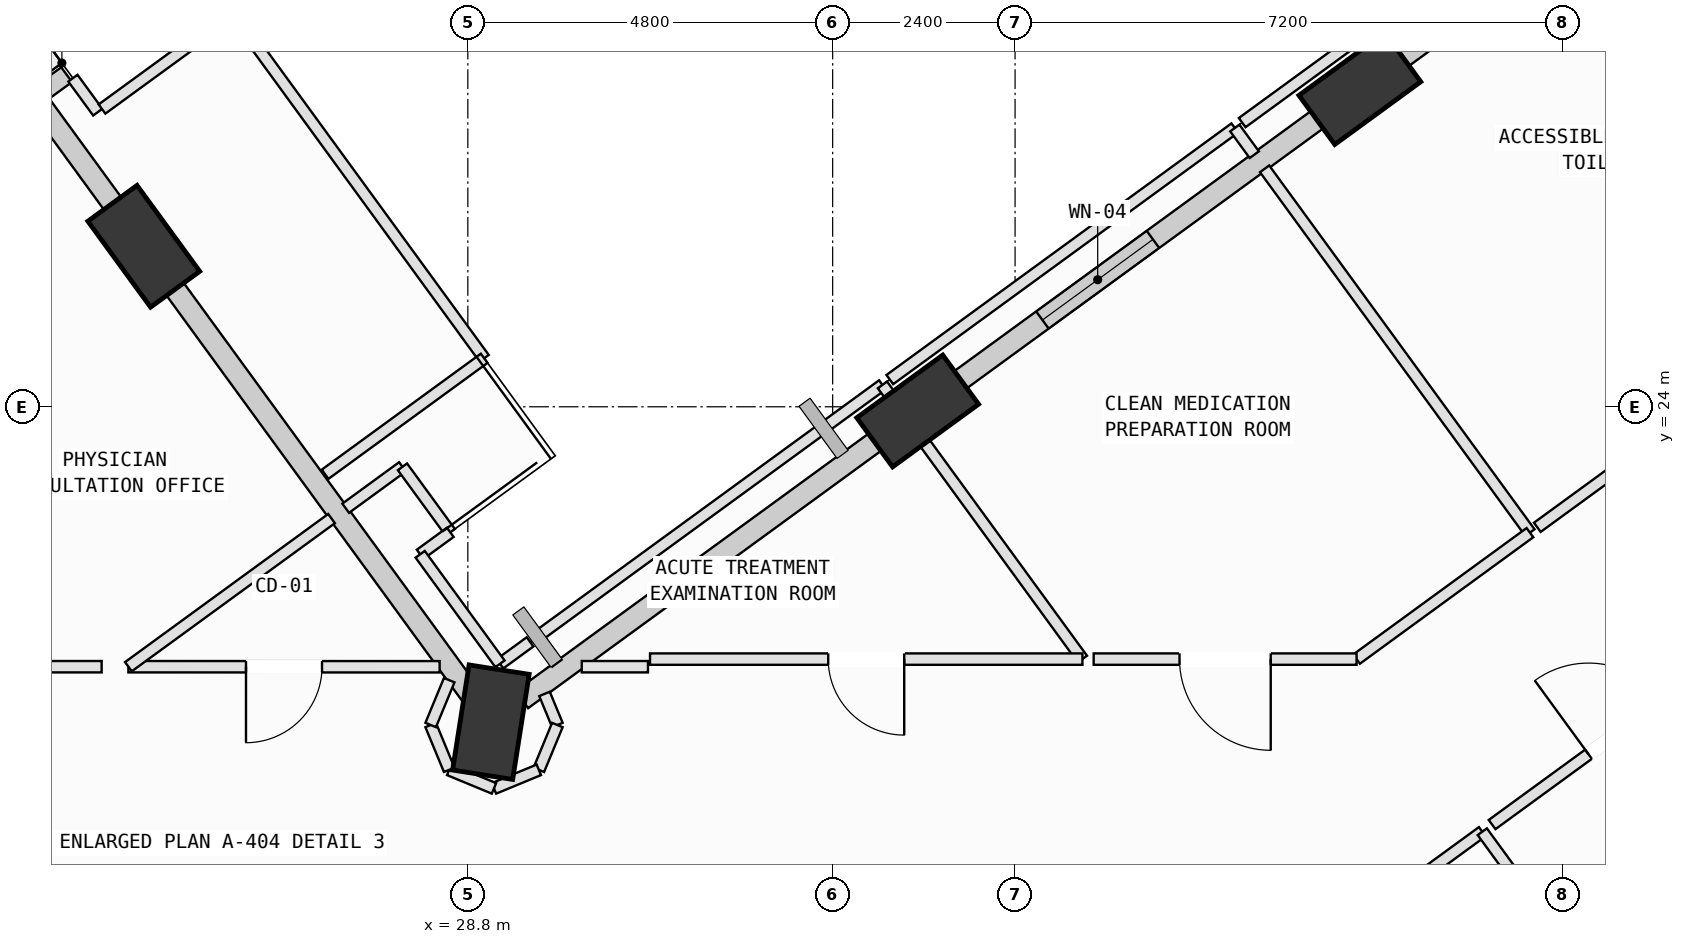
"""IFC4 building model, lengths in metres.
Left out: names, types, materials, properties, quantities, classifications, styles, units other than length and angle.
Written with IfcOpenShell. Run it as: python <this file> out.ifc"""

import sys

from ifc_helpers import new_model, si_unit, direction, frame, frame_2d, origin, origin_2d, place, context, subcontext, project, spatial, rectangle, extrude, element, fill, save


model = new_model("IFC4")
c1 = context("Model", 3, precision=1e-05, world=origin(), true_north=direction((0.0, 1.0)))
c2 = subcontext(c1, "Body", "Model", "MODEL_VIEW")
j1 = project(units=[si_unit("LENGTHUNIT", "METRE"), si_unit("PLANEANGLEUNIT", "RADIAN")], contexts=[c1])
p1 = place(None, origin())
s1 = spatial("IfcSite", under=j1, at=p1, CompositionType="ELEMENT")
p2 = place(p1, origin())
s2 = spatial("IfcBuilding", under=s1, at=p2, CompositionType="ELEMENT")
p3 = place(p2, frame((0.0, 0.0, 177.8)))
s3 = spatial("IfcBuildingStorey", under=s2, at=p3, CompositionType="ELEMENT", Elevation=177.8)
p4 = place(p3, frame((40.536, 28.187, 0.002), z_axis=(-0.014288016572, 0.028576033144, 0.999489501152), x_axis=(-0.459326015506, -0.888068274517, 0.018824220468)))
e1 = element("IfcColumn", 1, at=p4, inside=s3, PredefinedType="COLUMN", context=c2, shape_type="SweptSolid", body=[
    extrude(rectangle(XDim=1.4, YDim=0.8, at=origin_2d()), origin(), (0.0, 0.0, 1.0), 3.998),
])
p5 = place(p3, frame((34.719, 23.945, 0.002), z_axis=(0.003543221591, 0.004703932113, 0.999982659151), x_axis=(-0.999873545111, 0.015519473566, 0.003469831154)))
e2 = element("IfcColumn", 2, at=p5, inside=s3, PredefinedType="COLUMN", context=c2, shape_type="SweptSolid", body=[
    extrude(rectangle(XDim=1.4, YDim=0.8, at=origin_2d()), origin(), (0.0, 0.0, 1.0), 3.996),
])
p6 = place(p3, frame((29.103, 19.85, 0.002), z_axis=(0.020701917139, -0.018442415858, 0.999615580073), x_axis=(-0.634495197242, 0.772441293225, 0.027391480385)))
e3 = element("IfcColumn", 3, at=p6, inside=s3, PredefinedType="COLUMN", context=c2, shape_type="SweptSolid", body=[
    extrude(rectangle(XDim=1.4, YDim=0.8, at=origin_2d()), origin(), (0.0, 0.0, 1.0), 3.998),
])
p7 = place(p3, frame((24.537, 26.112, 0.002), z_axis=(-0.005127954064, -0.037604996467, 0.999279524622), x_axis=(-0.474702077533, 0.879612161779, 0.030665655638)))
e4 = element("IfcColumn", 4, at=p7, inside=s3, PredefinedType="COLUMN", context=c2, shape_type="SweptSolid", body=[
    extrude(rectangle(XDim=1.4, YDim=0.8, at=origin_2d()), origin(), (0.0, 0.0, 1.0), 3.999),
])
p8 = place(p3, frame((21.501, 26.897, 0.0), z_axis=(0.0, 0.0, 1.0), x_axis=(0.808013341442, 0.589164187686, 0.0)))
e5 = element("IfcWall", 5, at=p8, inside=s3, PredefinedType="SOLIDWALL", context=c2, shape_type="SweptSolid", body=[
    extrude(rectangle(XDim=2.5, YDim=0.24, at=frame_2d((1.25, 0.0))), origin(), (0.0, 0.0, 1.0), 3.265),
])
p9 = place(p3, frame((40.942, 28.483, 0.0), z_axis=(0.0, 0.0, 1.0), x_axis=(0.807987697301, 0.589199355915, 0.0)))
e6 = element("IfcWall", 6, at=p9, inside=s3, PredefinedType="SOLIDWALL", context=c2, shape_type="SweptSolid", body=[
    extrude(rectangle(XDim=6.227, YDim=0.28, at=frame_2d((3.113, 0.0))), origin(), (0.0, 0.0, 1.0), 3.065),
])
p10 = place(p9, frame((0.996, 0.0, 0.75)))
e7 = element("IfcOpeningElement", 7, at=p10, cuts=e6, PredefinedType="OPENING", context=c2, shape_type="SweptSolid", body=[
    extrude(rectangle(XDim=1.4, YDim=1.85, at=frame_2d((0.7, 0.925))), frame((0.0, 0.15, 0.0), z_axis=(0.0, -1.0, 0.0), x_axis=(1.0, 0.0, 0.0)), (0.0, 0.0, 1.0), 0.3),
])
p11 = place(p3, frame((35.129, 24.244, 0.0), z_axis=(0.0, 0.0, 1.0), x_axis=(0.808002852065, 0.589178573147, 0.0)))
e8 = element("IfcWall", 8, at=p11, inside=s3, PredefinedType="SOLIDWALL", context=c2, shape_type="SweptSolid", body=[
    extrude(rectangle(XDim=6.211, YDim=0.28, at=frame_2d((3.105, 0.0))), origin(), (0.0, 0.0, 1.0), 3.265),
])
p12 = place(p11, frame((1.524, 0.0, 0.75)))
e9 = element("IfcOpeningElement", 9, at=p12, cuts=e8, PredefinedType="OPENING", context=c2, shape_type="SweptSolid", body=[
    extrude(rectangle(XDim=1.8, YDim=2.05, at=frame_2d((0.9, 1.025))), frame((0.0, 0.15, 0.0), z_axis=(0.0, -1.0, 0.0), x_axis=(1.0, 0.0, 0.0)), (0.0, 0.0, 1.0), 0.3),
])
p13 = place(p3, frame((29.511, 20.147, 0.0), z_axis=(0.0, 0.0, 1.0), x_axis=(0.807984372864, 0.589203914793, 0.0)))
e10 = element("IfcWall", 10, at=p13, inside=s3, PredefinedType="SOLIDWALL", context=c2, shape_type="SweptSolid", body=[
    extrude(rectangle(XDim=5.96, YDim=0.28, at=frame_2d((2.98, 0.0))), origin(), (0.0, 0.0, 1.0), 3.265),
])
p14 = place(p3, frame((28.843, 20.207, 0.0), z_axis=(0.0, 0.0, 1.0), x_axis=(-0.589197701426, 0.807988903782, 0.0)))
e11 = element("IfcWall", 11, at=p14, inside=s3, PredefinedType="SOLIDWALL", context=c2, shape_type="SweptSolid", body=[
    extrude(rectangle(XDim=6.76, YDim=0.28, at=frame_2d((3.38, 0.0))), origin(), (0.0, 0.0, 1.0), 3.265),
])
p15 = place(p3, frame((24.278, 26.466, 0.0), z_axis=(0.0, 0.0, 1.0), x_axis=(-0.589146798516, 0.808026020496, 0.0)))
e12 = element("IfcWall", 12, at=p15, inside=s3, PredefinedType="SOLIDWALL", context=c2, shape_type="SweptSolid", body=[
    extrude(rectangle(XDim=1.964, YDim=0.28, at=frame_2d((0.982, 0.0))), origin(), (0.0, 0.0, 1.0), 3.245),
])
p16 = place(p3, frame((38.64, 15.851, 0.0), z_axis=(0.0, 0.0, 1.0), x_axis=(0.807940029347, 0.589264718933, 0.0)))
e13 = element("IfcWall", 13, at=p16, inside=s3, PredefinedType="PARTITIONING", context=c2, shape_type="SweptSolid", body=[
    extrude(rectangle(XDim=4.341, YDim=0.15, at=frame_2d((2.17, 0.0))), origin(), (0.0, 0.0, 1.0), 3.78),
])
p17 = place(p16, frame((1.57, 0.0, 0.0)))
e14 = element("IfcOpeningElement", 14, at=p17, cuts=e13, PredefinedType="OPENING", context=c2, shape_type="SweptSolid", body=[
    extrude(rectangle(XDim=1.2, YDim=2.15, at=frame_2d((0.6, 1.075))), frame((0.0, 0.085, 0.0), z_axis=(0.0, -1.0, 0.0), x_axis=(1.0, 0.0, 0.0)), (0.0, 0.0, 1.0), 0.17),
])
p18 = place(p3, frame((42.147, 18.409, 0.0), z_axis=(0.0, 0.0, 1.0), x_axis=(0.589164923699, -0.808012804776, 0.0)))
e15 = element("IfcWall", 15, at=p18, inside=s3, PredefinedType="PARTITIONING", context=c2, shape_type="SweptSolid", body=[
    extrude(rectangle(XDim=11.936, YDim=0.15, at=frame_2d((5.968, 0.0))), origin(), (0.0, 0.0, 1.0), 3.78),
])
p19 = place(p3, frame((42.276, 18.503, 0.0), z_axis=(0.0, 0.0, 1.0), x_axis=(0.808020361036, 0.589154560494, 0.0)))
e16 = element("IfcWall", 16, at=p19, inside=s3, PredefinedType="PARTITIONING", context=c2, shape_type="SweptSolid", body=[
    extrude(rectangle(XDim=4.34, YDim=0.15, at=frame_2d((2.17, 0.0))), origin(), (0.0, 0.0, 1.0), 3.78),
])
p20 = place(p19, frame((1.57, 0.0, 0.0)))
e17 = element("IfcOpeningElement", 17, at=p20, cuts=e16, PredefinedType="OPENING", context=c2, shape_type="SweptSolid", body=[
    extrude(rectangle(XDim=1.2, YDim=2.15, at=frame_2d((0.6, 1.075))), frame((0.0, 0.085, 0.0), z_axis=(0.0, -1.0, 0.0), x_axis=(1.0, 0.0, 0.0)), (0.0, 0.0, 1.0), 0.17),
])
p21 = place(p3, frame((29.223, 20.618, 0.0), z_axis=(0.0, 0.0, 1.0), x_axis=(0.807701219135, 0.589592011995, 0.0)))
e18 = element("IfcWall", 18, at=p21, inside=s3, PredefinedType="PARTITIONING", context=c2, shape_type="SweptSolid", body=[
    extrude(rectangle(XDim=0.49, YDim=0.15, at=frame_2d((0.245, 0.0))), origin(), (0.0, 0.0, 1.0), 3.78),
])
p22 = place(p3, frame((29.809, 20.222, 0.0), z_axis=(0.0, 0.0, 1.0), x_axis=(0.381831882466, -0.92423179643, 0.0)))
e19 = element("IfcWall", 19, at=p22, inside=s3, PredefinedType="PARTITIONING", context=c2, shape_type="SweptSolid", body=[
    extrude(rectangle(XDim=0.442, YDim=0.15, at=frame_2d((0.221, 0.0))), origin(), (0.0, 0.0, 1.0), 3.78),
])
p23 = place(p3, frame((29.978, 19.813, 0.0), z_axis=(0.0, 0.0, 1.0), x_axis=(-0.382306769343, -0.924035461503, 0.0)))
e20 = element("IfcWall", 20, at=p23, inside=s3, PredefinedType="PARTITIONING", context=c2, shape_type="SweptSolid", body=[
    extrude(rectangle(XDim=0.639, YDim=0.15, at=frame_2d((0.319, 0.0))), origin(), (0.0, 0.0, 1.0), 3.78),
])
p24 = place(p3, frame((29.734, 19.223, 0.0), z_axis=(0.0, 0.0, 1.0), x_axis=(-0.924114659462, -0.382115291723, 0.0)))
e21 = element("IfcWall", 21, at=p24, inside=s3, PredefinedType="PARTITIONING", context=c2, shape_type="SweptSolid", body=[
    extrude(rectangle(XDim=0.638, YDim=0.15, at=frame_2d((0.319, 0.0))), origin(), (0.0, 0.0, 1.0), 3.415),
])
p25 = place(p3, frame((29.144, 18.979, 0.0), z_axis=(0.0, 0.0, 1.0), x_axis=(-0.923946844683, 0.382520885967, 0.0)))
e22 = element("IfcWall", 22, at=p25, inside=s3, PredefinedType="PARTITIONING", context=c2, shape_type="SweptSolid", body=[
    extrude(rectangle(XDim=0.638, YDim=0.15, at=frame_2d((0.319, 0.0))), origin(), (0.0, 0.0, 1.0), 3.78),
])
for number, where, z_axis, x_axis in (
    (23, (28.555, 19.223, 0.0), (0.0, 0.0, 1.0), (-0.382, 0.924, 0.0)),
    (24, (28.311, 19.813, 0.0), (0.0, 0.0, 1.0), (0.382, 0.924, 0.0)),
):
    element("IfcWall", number, at=place(p3, frame(where, z_axis=z_axis, x_axis=x_axis)), inside=s3, PredefinedType="PARTITIONING", context=c2, shape_type="SweptSolid", body=[
        extrude(rectangle(XDim=0.638, YDim=0.15, at=frame_2d((0.319, 0.0))), origin(), (0.0, 0.0, 1.0), 3.78),
    ])
p26 = place(p3, frame((28.429, 20.579, 0.0), z_axis=(0.0, 0.0, 1.0), x_axis=(-0.999999971564, 0.0002384785, 0.0)))
e25 = element("IfcWall", 25, at=p26, inside=s3, PredefinedType="PARTITIONING", context=c2, shape_type="SweptSolid", body=[
    extrude(rectangle(XDim=4.095, YDim=0.15, at=frame_2d((2.047, 0.0))), origin(), (0.0, 0.0, 1.0), 3.78),
])
p27 = place(p26, frame((1.548, 0.0, 0.0)))
e26 = element("IfcOpeningElement", 26, at=p27, cuts=e25, PredefinedType="OPENING", context=c2, shape_type="SweptSolid", body=[
    extrude(rectangle(XDim=1.0, YDim=2.12, at=frame_2d((0.5, 1.06))), frame((0.0, 0.085, 0.0), z_axis=(0.0, -1.0, 0.0), x_axis=(1.0, 0.0, 0.0)), (0.0, 0.0, 1.0), 0.17),
])
p28 = place(p3, frame((24.334, 20.58, 0.0), z_axis=(0.0, 0.0, 1.0), x_axis=(0.808030219446, 0.589141039532, 0.0)))
e27 = element("IfcWall", 27, at=p28, inside=s3, PredefinedType="PARTITIONING", context=c2, shape_type="SweptSolid", body=[
    extrude(rectangle(XDim=3.308, YDim=0.15, at=frame_2d((1.654, 0.0))), origin(), (0.0, 0.0, 1.0), 3.78),
])
p29 = place(p3, frame((27.193, 22.665, 0.0), z_axis=(0.0, 0.0, 1.0), x_axis=(0.807821533762, 0.589427153761, 0.0)))
e28 = element("IfcWall", 28, at=p29, inside=s3, PredefinedType="PARTITIONING", context=c2, shape_type="SweptSolid", body=[
    extrude(rectangle(XDim=0.925, YDim=0.15, at=frame_2d((0.462, 0.0))), origin(), (0.0, 0.0, 1.0), 3.78),
])
p30 = place(p3, frame((27.94, 23.21, 0.0), z_axis=(0.0, 0.0, 1.0), x_axis=(0.589517481751, -0.807755618185, 0.0)))
e29 = element("IfcWall", 29, at=p30, inside=s3, PredefinedType="PARTITIONING", context=c2, shape_type="SweptSolid", body=[
    extrude(rectangle(XDim=1.067, YDim=0.15, at=frame_2d((0.534, 0.0))), origin(), (0.0, 0.0, 1.0), 3.78),
])
p31 = place(p3, frame((28.569, 22.348, 0.0), z_axis=(0.0, 0.0, 1.0), x_axis=(-0.807938361971, -0.589267005063, 0.0)))
e30 = element("IfcWall", 30, at=p31, inside=s3, PredefinedType="PARTITIONING", context=c2, shape_type="SweptSolid", body=[
    extrude(rectangle(XDim=0.49, YDim=0.15, at=frame_2d((0.245, 0.0))), origin(), (0.0, 0.0, 1.0), 3.78),
])
p32 = place(p3, frame((28.173, 22.059, 0.0), z_axis=(0.0, 0.0, 1.0), x_axis=(0.588790291938, -0.808285835654, 0.0)))
e31 = element("IfcWall", 31, at=p32, inside=s3, PredefinedType="PARTITIONING", context=c2, shape_type="SweptSolid", body=[
    extrude(rectangle(XDim=1.783, YDim=0.15, at=frame_2d((0.892, 0.0))), origin(), (0.0, 0.0, 1.0), 3.78),
])
p33 = place(p3, frame((31.17, 20.58, 0.0), z_axis=(0.0, 0.0, 1.0), x_axis=(-1.0, 0.0, 0.0)))
e32 = element("IfcWall", 32, at=p33, inside=s3, PredefinedType="PARTITIONING", context=c2, shape_type="SweptSolid", body=[
    extrude(rectangle(XDim=0.871, YDim=0.15, at=frame_2d((0.436, 0.0))), origin(), (0.0, 0.0, 1.0), 3.78),
])
p34 = place(p3, frame((29.972, 20.626, 0.0), z_axis=(0.0, 0.0, 1.0), x_axis=(-0.587904822125, 0.808930108305, 0.0)))
e33 = element("IfcWall", 33, at=p34, inside=s3, PredefinedType="PARTITIONING", context=c2, shape_type="SweptSolid", body=[
    extrude(rectangle(XDim=0.435, YDim=0.15, at=frame_2d((0.218, 0.0))), origin(), (0.0, 0.0, 1.0), 3.78),
])
p35 = place(p3, frame((29.716, 20.978, 0.0), z_axis=(0.0, 0.0, 1.0), x_axis=(0.807964856264, 0.589230677275, 0.0)))
e34 = element("IfcWall", 34, at=p35, inside=s3, PredefinedType="PARTITIONING", context=c2, shape_type="SweptSolid", body=[
    extrude(rectangle(XDim=5.618, YDim=0.15, at=frame_2d((2.809, 0.0))), origin(), (0.0, 0.0, 1.0), 3.78),
])
p36 = place(p3, frame((34.255, 24.288, 0.0), z_axis=(0.0, 0.0, 1.0), x_axis=(0.589195209421, -0.807990720983, 0.0)))
e35 = element("IfcWall", 35, at=p36, inside=s3, PredefinedType="PARTITIONING", context=c2, shape_type="SweptSolid", body=[
    extrude(rectangle(XDim=4.466, YDim=0.15, at=frame_2d((2.233, 0.0))), origin(), (0.0, 0.0, 1.0), 3.78),
])
p37 = place(p3, frame((36.886, 20.68, 0.0), z_axis=(0.0, 0.0, 1.0), x_axis=(-1.0, 0.0, 0.0)))
e36 = element("IfcWall", 36, at=p37, inside=s3, PredefinedType="PARTITIONING", context=c2, shape_type="SweptSolid", body=[
    extrude(rectangle(XDim=5.689, YDim=0.15, at=frame_2d((2.844, 0.0))), origin(), (0.0, 0.0, 1.0), 3.415),
])
p38 = place(p37, frame((2.344, 0.0, 0.0)))
e37 = element("IfcOpeningElement", 37, at=p38, cuts=e36, PredefinedType="OPENING", context=c2, shape_type="SweptSolid", body=[
    extrude(rectangle(XDim=1.0, YDim=2.12, at=frame_2d((0.5, 1.06))), frame((0.0, 0.085, 0.0), z_axis=(0.0, -1.0, 0.0), x_axis=(1.0, 0.0, 0.0)), (0.0, 0.0, 1.0), 0.17),
])
p39 = place(p3, frame((34.352, 24.358, 0.0), z_axis=(0.0, 0.0, 1.0), x_axis=(0.807979944468, 0.589209987473, 0.0)))
e38 = element("IfcWall", 38, at=p39, inside=s3, PredefinedType="PARTITIONING", context=c2, shape_type="SweptSolid", body=[
    extrude(rectangle(XDim=5.618, YDim=0.15, at=frame_2d((2.809, 0.0))), origin(), (0.0, 0.0, 1.0), 3.78),
])
p40 = place(p3, frame((38.891, 27.668, 0.0), z_axis=(0.0, 0.0, 1.0), x_axis=(0.588973394119, -0.808152424373, 0.0)))
e39 = element("IfcWall", 39, at=p40, inside=s3, PredefinedType="PARTITIONING", context=c2, shape_type="SweptSolid", body=[
    extrude(rectangle(XDim=0.434, YDim=0.15, at=frame_2d((0.217, 0.0))), origin(), (0.0, 0.0, 1.0), 3.78),
])
p41 = place(p3, frame((39.283, 27.131, 0.0), z_axis=(0.0, 0.0, 1.0), x_axis=(0.58921251088, -0.807978104296, 0.0)))
e40 = element("IfcWall", 40, at=p41, inside=s3, PredefinedType="PARTITIONING", context=c2, shape_type="SweptSolid", body=[
    extrude(rectangle(XDim=5.925, YDim=0.15, at=frame_2d((2.962, 0.0))), origin(), (0.0, 0.0, 1.0), 3.78),
])
p42 = place(p3, frame((42.774, 22.344, 0.0), z_axis=(0.0, 0.0, 1.0), x_axis=(-0.807867723335, -0.589363844831, 0.0)))
e41 = element("IfcWall", 41, at=p42, inside=s3, PredefinedType="PARTITIONING", context=c2, shape_type="SweptSolid", body=[
    extrude(rectangle(XDim=2.823, YDim=0.15, at=frame_2d((1.412, 0.0))), origin(), (0.0, 0.0, 1.0), 3.78),
])
p43 = place(p3, frame((40.493, 20.68, 0.0), z_axis=(0.0, 0.0, 1.0), x_axis=(-1.0, 0.0, 0.0)))
e42 = element("IfcWall", 42, at=p43, inside=s3, PredefinedType="PARTITIONING", context=c2, shape_type="SweptSolid", body=[
    extrude(rectangle(XDim=3.459, YDim=0.15, at=frame_2d((1.729, 0.0))), origin(), (0.0, 0.0, 1.0), 3.78),
])
p44 = place(p43, frame((1.129, 0.0, 0.0)))
e43 = element("IfcOpeningElement", 43, at=p44, cuts=e42, PredefinedType="OPENING", context=c2, shape_type="SweptSolid", body=[
    extrude(rectangle(XDim=1.2, YDim=2.15, at=frame_2d((0.6, 1.075))), frame((0.0, 0.085, 0.0), z_axis=(0.0, -1.0, 0.0), x_axis=(1.0, 0.0, 0.0)), (0.0, 0.0, 1.0), 0.17),
])
p45 = place(p3, frame((47.41, 25.724, 0.0), z_axis=(0.0, 0.0, 1.0), x_axis=(-0.807964856264, -0.589230677275, 0.0)))
e44 = element("IfcWall", 44, at=p45, inside=s3, PredefinedType="PARTITIONING", context=c2, shape_type="SweptSolid", body=[
    extrude(rectangle(XDim=5.618, YDim=0.15, at=frame_2d((2.809, 0.0))), origin(), (0.0, 0.0, 1.0), 3.78),
])
p46 = place(p45, frame((2.349, 0.0, 0.0)))
e45 = element("IfcOpeningElement", 45, at=p46, cuts=e44, PredefinedType="OPENING", context=c2, shape_type="SweptSolid", body=[
    extrude(rectangle(XDim=0.92, YDim=2.1, at=frame_2d((0.46, 1.05))), frame((0.0, 0.085, 0.0), z_axis=(0.0, -1.0, 0.0), x_axis=(1.0, 0.0, 0.0)), (0.0, 0.0, 1.0), 0.17),
])
p47 = place(p3, frame((38.988, 27.739, 0.0), z_axis=(0.0, 0.0, 1.0), x_axis=(0.807979944468, 0.589209987473, 0.0)))
e46 = element("IfcWall", 46, at=p47, inside=s3, PredefinedType="PARTITIONING", context=c2, shape_type="SweptSolid", body=[
    extrude(rectangle(XDim=5.618, YDim=0.15, at=frame_2d((2.809, 0.0))), origin(), (0.0, 0.0, 1.0), 3.265),
])
p48 = place(p3, frame((23.982, 20.58, 0.0), z_axis=(0.0, 0.0, 1.0), x_axis=(-1.0, 0.0, 0.0)))
e47 = element("IfcWall", 47, at=p48, inside=s3, PredefinedType="PARTITIONING", context=c2, shape_type="SweptSolid", body=[
    extrude(rectangle(XDim=0.733, YDim=0.15, at=frame_2d((0.366, 0.0))), origin(), (0.0, 0.0, 1.0), 3.78),
])
p49 = place(p3, frame((23.604, 28.324, 0.0), z_axis=(0.0, 0.0, 1.0), x_axis=(0.590292880672, -0.807189144518, 0.0)))
e48 = element("IfcWall", 48, at=p49, inside=s3, PredefinedType="PARTITIONING", context=c2, shape_type="SweptSolid", body=[
    extrude(rectangle(XDim=0.554, YDim=0.15, at=frame_2d((0.277, 0.0))), origin(), (0.0, 0.0, 1.0), 3.78),
])
p50 = place(p3, frame((25.708, 29.173, 0.0), z_axis=(0.0, 0.0, 1.0), x_axis=(0.589172157449, -0.808007530216, 0.0)))
e49 = element("IfcWall", 49, at=p50, inside=s3, PredefinedType="PARTITIONING", context=c2, shape_type="SweptSolid", body=[
    extrude(rectangle(XDim=5.613, YDim=0.15, at=frame_2d((2.806, 0.0))), origin(), (0.0, 0.0, 1.0), 3.78),
])
p51 = place(p3, frame((29.015, 24.638, 0.0), z_axis=(0.0, 0.0, 1.0), x_axis=(-0.808026227574, -0.589146514505, 0.0)))
e50 = element("IfcWall", 50, at=p51, inside=s3, PredefinedType="PARTITIONING", context=c2, shape_type="SweptSolid", body=[
    extrude(rectangle(XDim=2.59, YDim=0.15, at=frame_2d((1.295, 0.0))), origin(), (0.0, 0.0, 1.0), 3.78),
])
p52 = place(p3, frame((23.987, 27.918, 0.0), z_axis=(0.0, 0.0, 1.0), x_axis=(0.80794727728, 0.589254781174, 0.0)))
e51 = element("IfcWall", 51, at=p52, inside=s3, PredefinedType="PARTITIONING", context=c2, shape_type="SweptSolid", body=[
    extrude(rectangle(XDim=2.13, YDim=0.15, at=frame_2d((1.065, 0.0))), origin(), (0.0, 0.0, 1.0), 3.78),
])
p53 = place(p12, origin())
e52 = element("IfcWindow", 52, at=p53, inside=s3, PartitioningType="SINGLE_PANEL", PredefinedType="WINDOW", context=c2, shape_type="SweptSolid", body=[
    extrude(rectangle(XDim=1.8, YDim=2.05, at=frame_2d((0.9, 1.025))), frame((0.0, 0.03, 0.0), z_axis=(0.0, -1.0, 0.0), x_axis=(1.0, 0.0, 0.0)), (0.0, 0.0, 1.0), 0.06),
])
fill(e9, e52)
p54 = place(p20, origin())
e53 = element("IfcDoor", 53, at=p54, inside=s3, OperationType="SINGLE_SWING_LEFT", PredefinedType="DOOR", context=c2, shape_type="SweptSolid", body=[
    extrude(rectangle(XDim=1.2, YDim=2.15, at=frame_2d((0.6, 1.075))), frame((0.0, 0.025, 0.0), z_axis=(0.0, -1.0, 0.0), x_axis=(1.0, 0.0, 0.0)), (0.0, 0.0, 1.0), 0.05),
])
fill(e17, e53)
p55 = place(p27, origin())
e54 = element("IfcDoor", 54, at=p55, inside=s3, OperationType="SINGLE_SWING_RIGHT", PredefinedType="DOOR", context=c2, shape_type="SweptSolid", body=[
    extrude(rectangle(XDim=1.0, YDim=2.12, at=frame_2d((0.5, 1.06))), frame((0.0, 0.025, 0.0), z_axis=(0.0, -1.0, 0.0), x_axis=(1.0, 0.0, 0.0)), (0.0, 0.0, 1.0), 0.05),
])
fill(e26, e54)
p56 = place(p38, origin())
e55 = element("IfcDoor", 55, at=p56, inside=s3, OperationType="SINGLE_SWING_LEFT", PredefinedType="DOOR", context=c2, shape_type="SweptSolid", body=[
    extrude(rectangle(XDim=1.0, YDim=2.12, at=frame_2d((0.5, 1.06))), frame((0.0, 0.025, 0.0), z_axis=(0.0, -1.0, 0.0), x_axis=(1.0, 0.0, 0.0)), (0.0, 0.0, 1.0), 0.05),
])
fill(e37, e55)
p57 = place(p44, origin())
e56 = element("IfcDoor", 56, at=p57, inside=s3, OperationType="SINGLE_SWING_LEFT", PredefinedType="DOOR", context=c2, shape_type="SweptSolid", body=[
    extrude(rectangle(XDim=1.2, YDim=2.15, at=frame_2d((0.6, 1.075))), frame((0.0, 0.025, 0.0), z_axis=(0.0, -1.0, 0.0), x_axis=(1.0, 0.0, 0.0)), (0.0, 0.0, 1.0), 0.05),
])
fill(e43, e56)
save(model, sys.argv[1])
